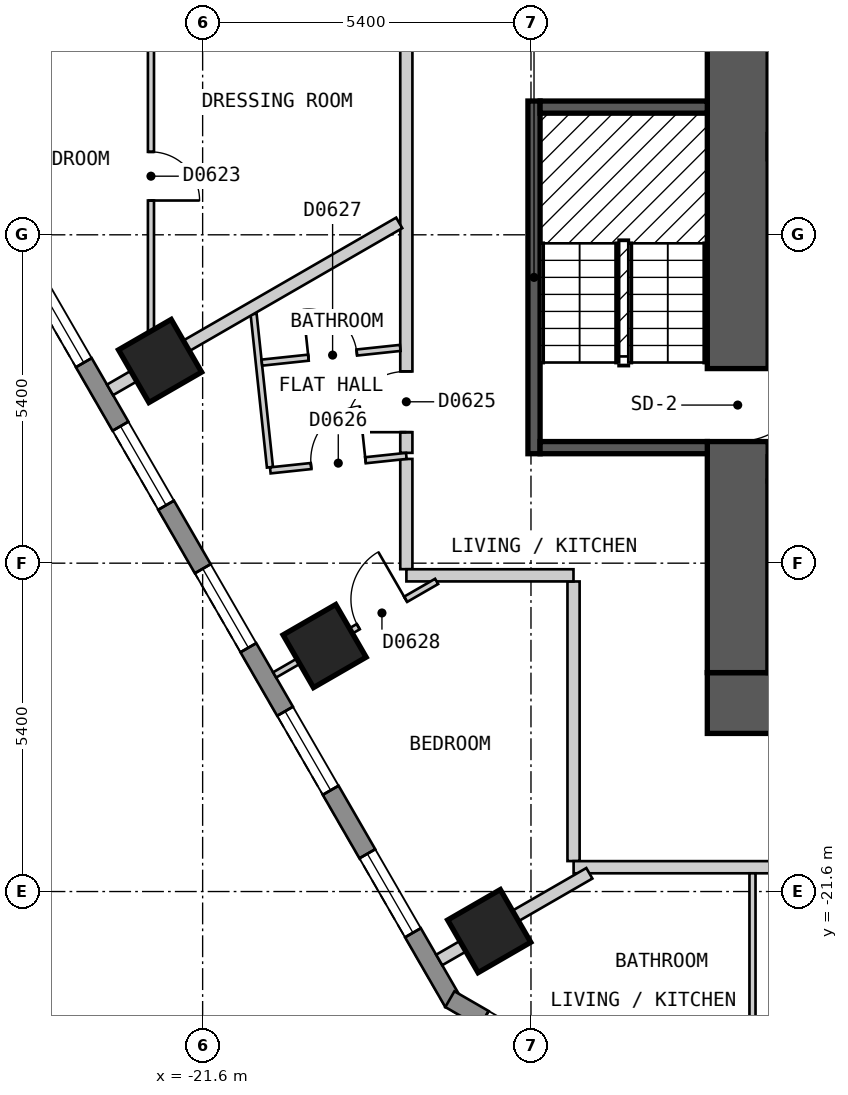
"""IFC4 building model, lengths in metres.
Left out: names, types, materials, properties, quantities, classifications, styles, units other than length and angle.
Written with IfcOpenShell. Run it as: python <this file> out.ifc"""

import sys

from ifc_helpers import new_model, si_unit, direction, frame, frame_2d, origin, origin_2d, place, context, subcontext, project, spatial, polyline, rectangle, outline, extrude, element, fill, save


model = new_model("IFC4")
c1 = context("Model", 3, precision=1e-05, world=origin(), true_north=direction((0.0, 1.0)))
c2 = subcontext(c1, "Body", "Model", "MODEL_VIEW")
j1 = project(units=[si_unit("LENGTHUNIT", "METRE"), si_unit("PLANEANGLEUNIT", "RADIAN")], contexts=[c1])
p1 = place(None, origin())
s1 = spatial("IfcSite", under=j1, at=p1, CompositionType="ELEMENT")
p2 = place(p1, origin())
s2 = spatial("IfcBuilding", under=s1, at=p2, CompositionType="ELEMENT")
p3 = place(p2, frame((0.0, 0.0, 75.0)))
s3 = spatial("IfcBuildingStorey", under=s2, at=p3, CompositionType="ELEMENT", Elevation=75.0)
for number, where, z_axis, x_axis in (
    (1, (-22.3, -12.875, 0.0), (0.0, 0.0, 1.0), (0.5, -0.866, 0.0)),
    (2, (-19.594, -17.563, 0.0), (0.0, 0.0, 1.0), (0.5, -0.866, 0.0)),
    (3, (-16.887, -22.251, 0.0), (0.0, 0.0, 1.0), (0.5, -0.866, 0.0)),
):
    element("IfcColumn", number, at=place(p3, frame(where, z_axis=z_axis, x_axis=x_axis)), inside=s3, PredefinedType="COLUMN", context=c2, shape_type="SweptSolid", body=[
        extrude(rectangle(XDim=1.0, YDim=1.0, at=origin_2d()), origin(), (0.0, 0.0, 1.0), 3.0),
    ])
p4 = place(p3, frame((-13.3, -18.5, 0.0), z_axis=(0.0, 0.0, 1.0), x_axis=(1.0, 0.0, 0.0)))
e4 = element("IfcWall", 4, at=p4, inside=s3, PredefinedType="SHEAR", context=c2, shape_type="SweptSolid", body=[
    extrude(rectangle(XDim=26.6, YDim=1.0, at=frame_2d((13.3, 0.0))), origin(), (0.0, 0.0, 1.0), 2.7),
])
p5 = place(p3, frame((-12.8, -18.0, 0.0), z_axis=(0.0, 0.0, 1.0), x_axis=(0.0, 1.0, 0.0)))
e5 = element("IfcWall", 5, at=p5, inside=s3, PredefinedType="SHEAR", context=c2, shape_type="SweptSolid", body=[
    extrude(rectangle(XDim=12.0, YDim=1.0, at=frame_2d((6.0, 0.0))), origin(), (0.0, 0.0, 1.0), 2.7),
])
p6 = place(p5, frame((3.8, 0.0, 0.0)))
e6 = element("IfcOpeningElement", 6, at=p6, cuts=e5, PredefinedType="OPENING", context=c2, shape_type="SweptSolid", body=[
    extrude(rectangle(XDim=1.2, YDim=2.1, at=frame_2d((0.6, 1.05))), frame((0.0, 0.51, 0.0), z_axis=(0.0, -1.0, 0.0), x_axis=(1.0, 0.0, 0.0)), (0.0, 0.0, 1.0), 1.02),
])
p7 = place(p3, frame((-29.027, -3.425, 0.0), z_axis=(0.0, 0.0, 1.0), x_axis=(0.500035407905, -0.866004960056, 0.0)))
e7 = element("IfcWall", 7, at=p7, inside=s3, PredefinedType="SOLIDWALL", context=c2, shape_type="SweptSolid", body=[
    extrude(outline(polyline([(0.0, -0.15), (23.094, -0.15), (23.014, 0.15), (0.08, 0.15), (0.0, -0.15)])), origin(), (0.0, 0.0, 1.0), 2.7),
])
p8 = place(p7, frame((1.324, 0.0, 0.15)))
e8 = element("IfcOpeningElement", 8, at=p8, cuts=e7, PredefinedType="OPENING", context=c2, shape_type="SweptSolid", body=[
    extrude(rectangle(XDim=1.5, YDim=2.1, at=frame_2d((0.75, 1.05))), frame((0.0, 0.16, 0.0), z_axis=(0.0, -1.0, 0.0), x_axis=(1.0, 0.0, 0.0)), (0.0, 0.0, 1.0), 0.32),
])
p9 = place(p7, frame((4.031, 0.0, 0.15)))
e9 = element("IfcOpeningElement", 9, at=p9, cuts=e7, PredefinedType="OPENING", context=c2, shape_type="SweptSolid", body=[
    extrude(rectangle(XDim=1.5, YDim=2.1, at=frame_2d((0.75, 1.05))), frame((0.0, 0.16, 0.0), z_axis=(0.0, -1.0, 0.0), x_axis=(1.0, 0.0, 0.0)), (0.0, 0.0, 1.0), 0.32),
])
p10 = place(p7, frame((6.737, 0.0, 0.15)))
e10 = element("IfcOpeningElement", 10, at=p10, cuts=e7, PredefinedType="OPENING", context=c2, shape_type="SweptSolid", body=[
    extrude(rectangle(XDim=1.5, YDim=2.1, at=frame_2d((0.75, 1.05))), frame((0.0, 0.16, 0.0), z_axis=(0.0, -1.0, 0.0), x_axis=(1.0, 0.0, 0.0)), (0.0, 0.0, 1.0), 0.32),
])
p11 = place(p7, frame((9.444, 0.0, 0.15)))
e11 = element("IfcOpeningElement", 11, at=p11, cuts=e7, PredefinedType="OPENING", context=c2, shape_type="SweptSolid", body=[
    extrude(rectangle(XDim=1.5, YDim=2.1, at=frame_2d((0.75, 1.05))), frame((0.0, 0.16, 0.0), z_axis=(0.0, -1.0, 0.0), x_axis=(1.0, 0.0, 0.0)), (0.0, 0.0, 1.0), 0.32),
])
p12 = place(p7, frame((12.151, 0.0, 0.15)))
e12 = element("IfcOpeningElement", 12, at=p12, cuts=e7, PredefinedType="OPENING", context=c2, shape_type="SweptSolid", body=[
    extrude(rectangle(XDim=1.5, YDim=2.1, at=frame_2d((0.75, 1.05))), frame((0.0, 0.16, 0.0), z_axis=(0.0, -1.0, 0.0), x_axis=(1.0, 0.0, 0.0)), (0.0, 0.0, 1.0), 0.32),
])
p13 = place(p7, frame((14.857, 0.0, 0.15)))
e13 = element("IfcOpeningElement", 13, at=p13, cuts=e7, PredefinedType="OPENING", context=c2, shape_type="SweptSolid", body=[
    extrude(rectangle(XDim=1.5, YDim=2.1, at=frame_2d((0.75, 1.05))), frame((0.0, 0.16, 0.0), z_axis=(0.0, -1.0, 0.0), x_axis=(1.0, 0.0, 0.0)), (0.0, 0.0, 1.0), 0.32),
])
p14 = place(p7, frame((17.564, 0.0, 0.15)))
e14 = element("IfcOpeningElement", 14, at=p14, cuts=e7, PredefinedType="OPENING", context=c2, shape_type="SweptSolid", body=[
    extrude(rectangle(XDim=1.5, YDim=2.1, at=frame_2d((0.75, 1.05))), frame((0.0, 0.16, 0.0), z_axis=(0.0, -1.0, 0.0), x_axis=(1.0, 0.0, 0.0)), (0.0, 0.0, 1.0), 0.32),
])
p15 = place(p7, frame((20.27, 0.0, 0.15)))
e15 = element("IfcOpeningElement", 15, at=p15, cuts=e7, PredefinedType="OPENING", context=c2, shape_type="SweptSolid", body=[
    extrude(rectangle(XDim=1.5, YDim=2.1, at=frame_2d((0.75, 1.05))), frame((0.0, 0.16, 0.0), z_axis=(0.0, -1.0, 0.0), x_axis=(1.0, 0.0, 0.0)), (0.0, 0.0, 1.0), 0.32),
])
p16 = place(p3, frame((-17.534, -23.37, 0.0), z_axis=(0.0, 0.0, 1.0), x_axis=(0.866010750942, -0.50002537861, 0.0)))
e16 = element("IfcWall", 16, at=p16, inside=s3, PredefinedType="SOLIDWALL", context=c2, shape_type="SweptSolid", body=[
    extrude(outline(polyline([(0.0, -0.15), (5.0, -0.15), (4.919, 0.15), (0.08, 0.15), (0.0, -0.15)])), origin(), (0.0, 0.0, 1.0), 2.7),
])
p17 = place(p16, frame((0.65, 0.0, 0.15)))
e17 = element("IfcOpeningElement", 17, at=p17, cuts=e16, PredefinedType="OPENING", context=c2, shape_type="SweptSolid", body=[
    extrude(rectangle(XDim=1.2, YDim=2.1, at=frame_2d((0.6, 1.05))), frame((0.0, 0.16, 0.0), z_axis=(0.0, -1.0, 0.0), x_axis=(1.0, 0.0, 0.0)), (0.0, 0.0, 1.0), 0.32),
])
p18 = place(p16, frame((3.15, 0.0, 0.15)))
e18 = element("IfcOpeningElement", 18, at=p18, cuts=e16, PredefinedType="OPENING", context=c2, shape_type="SweptSolid", body=[
    extrude(rectangle(XDim=1.2, YDim=2.1, at=frame_2d((0.6, 1.05))), frame((0.0, 0.16, 0.0), z_axis=(0.0, -1.0, 0.0), x_axis=(1.0, 0.0, 0.0)), (0.0, 0.0, 1.0), 0.32),
])
p19 = place(p3, frame((-15.5, -16.501, 0.0), z_axis=(0.0, 0.0, 1.0), x_axis=(0.0, -1.0, 0.0)))
e19 = element("IfcWall", 19, at=p19, inside=s3, PredefinedType="PARTITIONING", context=c2, shape_type="SweptSolid", body=[
    extrude(rectangle(XDim=4.598, YDim=0.2, at=frame_2d((2.299, 0.0))), origin(), (0.0, 0.0, 1.0), 2.7),
])
p20 = place(p3, frame((-18.25, -14.486, 0.0), z_axis=(0.0, 0.0, 1.0), x_axis=(0.0, -1.0, 0.0)))
e20 = element("IfcWall", 20, at=p20, inside=s3, PredefinedType="PARTITIONING", context=c2, shape_type="SweptSolid", body=[
    extrude(rectangle(XDim=1.813, YDim=0.2, at=frame_2d((0.906, 0.0))), origin(), (0.0, 0.0, 1.0), 2.7),
])
p21 = place(p3, frame((-18.249, -16.4, 0.0), z_axis=(0.0, 0.0, 1.0), x_axis=(1.0, 0.0, 0.0)))
e21 = element("IfcWall", 21, at=p21, inside=s3, PredefinedType="PARTITIONING", context=c2, shape_type="SweptSolid", body=[
    extrude(rectangle(XDim=2.748, YDim=0.2, at=frame_2d((1.374, 0.0))), origin(), (0.0, 0.0, 1.0), 2.7),
])
p22 = place(p3, frame((-15.499, -21.2, 0.0), z_axis=(0.0, 0.0, 1.0), x_axis=(1.0, 0.0, 0.0)))
e22 = element("IfcWall", 22, at=p22, inside=s3, PredefinedType="PARTITIONING", context=c2, shape_type="SweptSolid", body=[
    extrude(rectangle(XDim=30.898, YDim=0.2, at=frame_2d((15.449, 0.0))), origin(), (0.0, 0.0, 1.0), 2.7),
])
p23 = place(p22, frame((4.954, 0.0, 0.0)))
e23 = element("IfcOpeningElement", 23, at=p23, cuts=e22, PredefinedType="OPENING", context=c2, shape_type="SweptSolid", body=[
    extrude(rectangle(XDim=1.0, YDim=2.1, at=frame_2d((0.5, 1.05))), frame((0.0, 0.11, 0.0), z_axis=(0.0, -1.0, 0.0), x_axis=(1.0, 0.0, 0.0)), (0.0, 0.0, 1.0), 0.22),
])
p24 = place(p22, frame((25.046, 0.0, 0.0)))
e24 = element("IfcOpeningElement", 24, at=p24, cuts=e22, PredefinedType="OPENING", context=c2, shape_type="SweptSolid", body=[
    extrude(rectangle(XDim=1.0, YDim=2.1, at=frame_2d((0.5, 1.05))), frame((0.0, 0.11, 0.0), z_axis=(0.0, -1.0, 0.0), x_axis=(1.0, 0.0, 0.0)), (0.0, 0.0, 1.0), 0.22),
])
p25 = place(p3, frame((-18.25, -14.386, 0.0), z_axis=(0.0, 0.0, 1.0), x_axis=(0.0, 1.0, 0.0)))
e25 = element("IfcWall", 25, at=p25, inside=s3, PredefinedType="PARTITIONING", context=c2, shape_type="SweptSolid", body=[
    extrude(rectangle(XDim=7.786, YDim=0.2, at=frame_2d((3.893, 0.0))), origin(), (0.0, 0.0, 1.0), 2.7),
])
p26 = place(p25, frame((0.34, 0.0, 0.0)))
e26 = element("IfcOpeningElement", 26, at=p26, cuts=e25, PredefinedType="OPENING", context=c2, shape_type="SweptSolid", body=[
    extrude(rectangle(XDim=1.0, YDim=2.1, at=frame_2d((0.5, 1.05))), frame((0.0, 0.11, 0.0), z_axis=(0.0, -1.0, 0.0), x_axis=(1.0, 0.0, 0.0)), (0.0, 0.0, 1.0), 0.22),
])
p27 = place(p3, frame((-20.762, -12.102, 0.0), z_axis=(0.0, 0.0, 1.0), x_axis=(0.106118300401, -0.994353511745, 0.0)))
e27 = element("IfcWall", 27, at=p27, inside=s3, PredefinedType="PARTITIONING", context=c2, shape_type="SweptSolid", body=[
    extrude(rectangle(XDim=2.535, YDim=0.1, at=frame_2d((1.268, 0.0))), origin(), (0.0, 0.0, 1.0), 2.7),
])
p28 = place(p3, frame((-12.557, -21.3, 0.0), z_axis=(0.0, 0.0, 1.0), x_axis=(0.0, -1.0, 0.0)))
e28 = element("IfcWall", 28, at=p28, inside=s3, PredefinedType="PARTITIONING", context=c2, shape_type="SweptSolid", body=[
    extrude(rectangle(XDim=2.909, YDim=0.1, at=frame_2d((1.455, 0.0))), origin(), (0.0, 0.0, 1.0), 2.7),
])
p29 = place(p3, frame((-20.626, -12.902, 0.0), z_axis=(0.0, 0.0, 1.0), x_axis=(0.994385570266, 0.105817473257, 0.0)))
e29 = element("IfcWall", 29, at=p29, inside=s3, PredefinedType="PARTITIONING", context=c2, shape_type="SweptSolid", body=[
    extrude(rectangle(XDim=2.289, YDim=0.1, at=frame_2d((1.145, 0.0))), origin(), (0.0, 0.0, 1.0), 2.7),
])
p30 = place(p29, frame((0.77, 0.0, 0.0)))
e30 = element("IfcOpeningElement", 30, at=p30, cuts=e29, PredefinedType="OPENING", context=c2, shape_type="SweptSolid", body=[
    extrude(rectangle(XDim=0.8, YDim=2.1, at=frame_2d((0.4, 1.05))), frame((0.0, 0.06, 0.0), z_axis=(0.0, -1.0, 0.0), x_axis=(1.0, 0.0, 0.0)), (0.0, 0.0, 1.0), 0.12),
])
p31 = place(p3, frame((-20.487, -14.674, 0.0), z_axis=(0.0, 0.0, 1.0), x_axis=(0.994386484046, 0.105808885948, 0.0)))
e31 = element("IfcWall", 31, at=p31, inside=s3, PredefinedType="PARTITIONING", context=c2, shape_type="SweptSolid", body=[
    extrude(rectangle(XDim=2.25, YDim=0.1, at=frame_2d((1.125, 0.0))), origin(), (0.0, 0.0, 1.0), 2.7),
])
p32 = place(p31, frame((0.674, 0.0, 0.0)))
e32 = element("IfcOpeningElement", 32, at=p32, cuts=e31, PredefinedType="OPENING", context=c2, shape_type="SweptSolid", body=[
    extrude(rectangle(XDim=0.9, YDim=2.1, at=frame_2d((0.45, 1.05))), frame((0.0, 0.06, 0.0), z_axis=(0.0, -1.0, 0.0), x_axis=(1.0, 0.0, 0.0)), (0.0, 0.0, 1.0), 0.12),
])
p33 = place(p3, frame((-22.45, -12.846, 0.0), z_axis=(0.0, 0.0, 1.0), x_axis=(0.0, 1.0, 0.0)))
e33 = element("IfcWall", 33, at=p33, inside=s3, PredefinedType="PARTITIONING", context=c2, shape_type="SweptSolid", body=[
    extrude(rectangle(XDim=6.078, YDim=0.1, at=frame_2d((3.039, 0.0))), origin(), (0.0, 0.0, 1.0), 2.7),
])
p34 = place(p33, frame((2.61, 0.0, 0.0)))
e34 = element("IfcOpeningElement", 34, at=p34, cuts=e33, PredefinedType="OPENING", context=c2, shape_type="SweptSolid", body=[
    extrude(rectangle(XDim=0.8, YDim=2.1, at=frame_2d((0.4, 1.05))), frame((0.0, 0.06, 0.0), z_axis=(0.0, -1.0, 0.0), x_axis=(1.0, 0.0, 0.0)), (0.0, 0.0, 1.0), 0.12),
])
p35 = place(p3, frame((-20.416, -18.038, 0.0), z_axis=(0.0, 0.0, 1.0), x_axis=(0.866026989333, 0.499997253739, 0.0)))
e35 = element("IfcWall", 35, at=p35, inside=s3, PredefinedType="PARTITIONING", context=c2, shape_type="SweptSolid", body=[
    extrude(rectangle(XDim=3.076, YDim=0.1, at=frame_2d((1.538, 0.0))), origin(), (0.0, 0.0, 1.0), 2.7),
])
p36 = place(p35, frame((1.588, 0.0, 0.0)))
e36 = element("IfcOpeningElement", 36, at=p36, cuts=e35, PredefinedType="OPENING", context=c2, shape_type="SweptSolid", body=[
    extrude(rectangle(XDim=0.9, YDim=2.1, at=frame_2d((0.45, 1.05))), frame((0.0, 0.06, 0.0), z_axis=(0.0, -1.0, 0.0), x_axis=(1.0, 0.0, 0.0)), (0.0, 0.0, 1.0), 0.12),
])
p37 = place(p3, frame((-25.83, -8.662, 0.0), z_axis=(0.0, 0.0, 1.0), x_axis=(0.866022959057, 0.500004234368, 0.0)))
e37 = element("IfcWall", 37, at=p37, inside=s3, PredefinedType="PARTITIONING", context=c2, shape_type="SweptSolid", body=[
    extrude(rectangle(XDim=10.0, YDim=0.1, at=frame_2d((5.0, 0.0))), origin(), (0.0, 0.0, 1.0), 2.7),
])
p38 = place(p37, frame((1.501, 0.0, 0.0)))
e38 = element("IfcOpeningElement", 38, at=p38, cuts=e37, PredefinedType="OPENING", context=c2, shape_type="SweptSolid", body=[
    extrude(rectangle(XDim=0.9, YDim=2.1, at=frame_2d((0.45, 1.05))), frame((0.0, 0.06, 0.0), z_axis=(0.0, -1.0, 0.0), x_axis=(1.0, 0.0, 0.0)), (0.0, 0.0, 1.0), 0.12),
])
p39 = place(p3, frame((-17.709, -22.725, 0.0), z_axis=(0.0, 0.0, 1.0), x_axis=(0.866090043625, 0.499888023795, 0.0)))
e39 = element("IfcWall", 39, at=p39, inside=s3, PredefinedType="PARTITIONING", context=c2, shape_type="SweptSolid", body=[
    extrude(rectangle(XDim=2.851, YDim=0.2, at=frame_2d((1.425, 0.0))), origin(), (0.0, 0.0, 1.0), 2.7),
])
p40 = place(p3, frame((-23.123, -13.35, 0.0), z_axis=(0.0, 0.0, 1.0), x_axis=(0.866013095437, 0.500021318078, 0.0)))
e40 = element("IfcWall", 40, at=p40, inside=s3, PredefinedType="PARTITIONING", context=c2, shape_type="SweptSolid", body=[
    extrude(rectangle(XDim=5.492, YDim=0.2, at=frame_2d((2.746, 0.0))), origin(), (0.0, 0.0, 1.0), 2.7),
])
p41 = place(p3, frame((-16.15, -14.4, 0.0), z_axis=(0.0, 0.0, 1.0), x_axis=(0.0, 1.0, 0.0)))
e41 = element("IfcWall", 41, at=p41, inside=s3, PredefinedType="SOLIDWALL", context=c2, shape_type="SweptSolid", body=[
    extrude(rectangle(XDim=5.8, YDim=0.2, at=frame_2d((2.9, 0.0))), origin(), (0.0, 0.0, 1.0), 2.7),
])
for number, where, z_axis, x_axis in (
    (42, (-16.05, -14.3, 0.0), (0.0, 0.0, 1.0), (1.0, 0.0, 0.0)),
    (43, (-16.05, -8.7, 0.0), (0.0, 0.0, 1.0), (1.0, 0.0, 0.0)),
):
    element("IfcWall", number, at=place(p3, frame(where, z_axis=z_axis, x_axis=x_axis)), inside=s3, PredefinedType="SOLIDWALL", context=c2, shape_type="SweptSolid", body=[
        extrude(rectangle(XDim=2.75, YDim=0.2, at=frame_2d((1.375, 0.0))), origin(), (0.0, 0.0, 1.0), 2.7),
    ])
p42 = place(p11, origin())
e44 = element("IfcWindow", 44, at=p42, inside=s3, PartitioningType="SINGLE_PANEL", PredefinedType="WINDOW", context=c2, shape_type="SweptSolid", body=[
    extrude(rectangle(XDim=1.5, YDim=2.1, at=frame_2d((0.75, 1.05))), frame((0.0, 0.03, 0.0), z_axis=(0.0, -1.0, 0.0), x_axis=(1.0, 0.0, 0.0)), (0.0, 0.0, 1.0), 0.06),
])
fill(e11, e44)
p43 = place(p12, origin())
e45 = element("IfcWindow", 45, at=p43, inside=s3, PartitioningType="SINGLE_PANEL", PredefinedType="WINDOW", context=c2, shape_type="SweptSolid", body=[
    extrude(rectangle(XDim=1.5, YDim=2.1, at=frame_2d((0.75, 1.05))), frame((0.0, 0.03, 0.0), z_axis=(0.0, -1.0, 0.0), x_axis=(1.0, 0.0, 0.0)), (0.0, 0.0, 1.0), 0.06),
])
fill(e12, e45)
p44 = place(p13, origin())
e46 = element("IfcWindow", 46, at=p44, inside=s3, PartitioningType="SINGLE_PANEL", PredefinedType="WINDOW", context=c2, shape_type="SweptSolid", body=[
    extrude(rectangle(XDim=1.5, YDim=2.1, at=frame_2d((0.75, 1.05))), frame((0.0, 0.03, 0.0), z_axis=(0.0, -1.0, 0.0), x_axis=(1.0, 0.0, 0.0)), (0.0, 0.0, 1.0), 0.06),
])
fill(e13, e46)
p45 = place(p14, origin())
e47 = element("IfcWindow", 47, at=p45, inside=s3, PartitioningType="SINGLE_PANEL", PredefinedType="WINDOW", context=c2, shape_type="SweptSolid", body=[
    extrude(rectangle(XDim=1.5, YDim=2.1, at=frame_2d((0.75, 1.05))), frame((0.0, 0.03, 0.0), z_axis=(0.0, -1.0, 0.0), x_axis=(1.0, 0.0, 0.0)), (0.0, 0.0, 1.0), 0.06),
])
fill(e14, e47)
p46 = place(p15, origin())
e48 = element("IfcWindow", 48, at=p46, inside=s3, PartitioningType="SINGLE_PANEL", PredefinedType="WINDOW", context=c2, shape_type="SweptSolid", body=[
    extrude(rectangle(XDim=1.5, YDim=2.1, at=frame_2d((0.75, 1.05))), frame((0.0, 0.03, 0.0), z_axis=(0.0, -1.0, 0.0), x_axis=(1.0, 0.0, 0.0)), (0.0, 0.0, 1.0), 0.06),
])
fill(e15, e48)
p47 = place(p38, origin())
e49 = element("IfcDoor", 49, at=p47, inside=s3, OperationType="SINGLE_SWING_RIGHT", PredefinedType="DOOR", context=c2, shape_type="SweptSolid", body=[
    extrude(rectangle(XDim=0.9, YDim=2.1, at=frame_2d((0.45, 1.05))), frame((0.0, 0.025, 0.0), z_axis=(0.0, -1.0, 0.0), x_axis=(1.0, 0.0, 0.0)), (0.0, 0.0, 1.0), 0.05),
])
fill(e38, e49)
p48 = place(p34, origin())
e50 = element("IfcDoor", 50, at=p48, inside=s3, OperationType="SINGLE_SWING_LEFT", PredefinedType="DOOR", context=c2, shape_type="SweptSolid", body=[
    extrude(rectangle(XDim=0.8, YDim=2.1, at=frame_2d((0.4, 1.05))), frame((0.0, 0.025, 0.0), z_axis=(0.0, -1.0, 0.0), x_axis=(1.0, 0.0, 0.0)), (0.0, 0.0, 1.0), 0.05),
])
fill(e34, e50)
p49 = place(p26, origin())
e51 = element("IfcDoor", 51, at=p49, inside=s3, OperationType="SINGLE_SWING_LEFT", PredefinedType="DOOR", context=c2, shape_type="SweptSolid", body=[
    extrude(rectangle(XDim=1.0, YDim=2.1, at=frame_2d((0.5, 1.05))), frame((0.0, 0.025, 0.0), z_axis=(0.0, -1.0, 0.0), x_axis=(1.0, 0.0, 0.0)), (0.0, 0.0, 1.0), 0.05),
])
fill(e26, e51)
p50 = place(p32, origin())
e52 = element("IfcDoor", 52, at=p50, inside=s3, OperationType="SINGLE_SWING_RIGHT", PredefinedType="DOOR", context=c2, shape_type="SweptSolid", body=[
    extrude(rectangle(XDim=0.9, YDim=2.1, at=frame_2d((0.45, 1.05))), frame((0.0, 0.025, 0.0), z_axis=(0.0, -1.0, 0.0), x_axis=(1.0, 0.0, 0.0)), (0.0, 0.0, 1.0), 0.05),
])
fill(e32, e52)
p51 = place(p30, origin())
e53 = element("IfcDoor", 53, at=p51, inside=s3, OperationType="SINGLE_SWING_LEFT", PredefinedType="DOOR", context=c2, shape_type="SweptSolid", body=[
    extrude(rectangle(XDim=0.8, YDim=2.1, at=frame_2d((0.4, 1.05))), frame((0.0, 0.025, 0.0), z_axis=(0.0, -1.0, 0.0), x_axis=(1.0, 0.0, 0.0)), (0.0, 0.0, 1.0), 0.05),
])
fill(e30, e53)
p52 = place(p36, origin())
e54 = element("IfcDoor", 54, at=p52, inside=s3, OperationType="SINGLE_SWING_RIGHT", PredefinedType="DOOR", context=c2, shape_type="SweptSolid", body=[
    extrude(rectangle(XDim=0.9, YDim=2.1, at=frame_2d((0.45, 1.05))), frame((0.0, 0.025, 0.0), z_axis=(0.0, -1.0, 0.0), x_axis=(1.0, 0.0, 0.0)), (0.0, 0.0, 1.0), 0.05),
])
fill(e36, e54)
p53 = place(p6, origin())
e55 = element("IfcDoor", 55, at=p53, inside=s3, OperationType="SINGLE_SWING_RIGHT", PredefinedType="DOOR", context=c2, shape_type="SweptSolid", body=[
    extrude(rectangle(XDim=1.2, YDim=2.1, at=frame_2d((0.6, 1.05))), frame((0.0, 0.025, 0.0), z_axis=(0.0, -1.0, 0.0), x_axis=(1.0, 0.0, 0.0)), (0.0, 0.0, 1.0), 0.05),
])
fill(e6, e55)
save(model, sys.argv[1])
